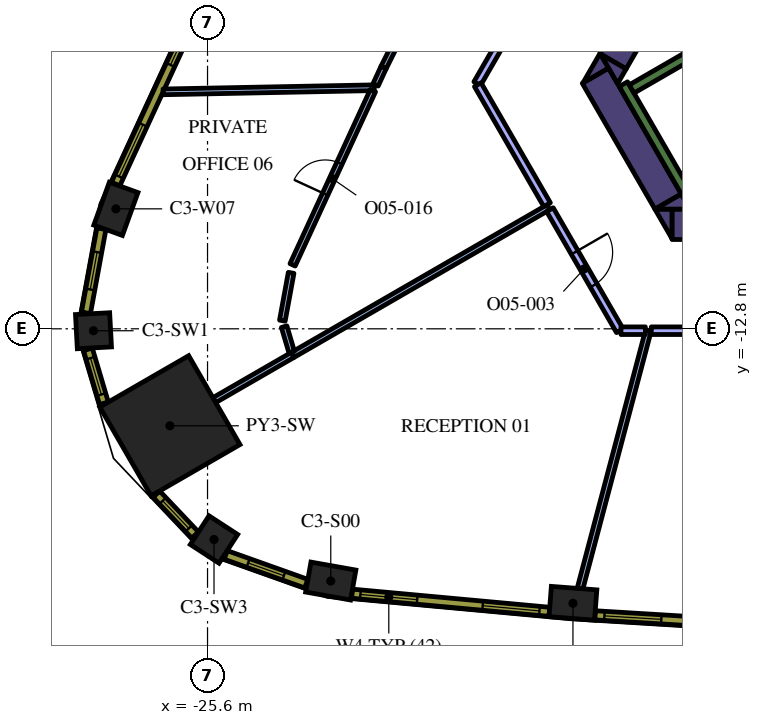
"""IFC4 building model, lengths in metres.
Left out: names, types, materials, properties, quantities, classifications, styles, units other than length and angle.
Written with IfcOpenShell. Run it as: python <this file> out.ifc"""

import sys

from ifc_helpers import new_model, si_unit, direction, frame, frame_2d, origin, origin_2d, place, context, subcontext, project, spatial, polyline, rectangle, outline, extrude, element, fill, save


model = new_model("IFC4")
c1 = context("Model", 3, precision=1e-05, world=origin(), true_north=direction((0.0, 1.0)))
c2 = subcontext(c1, "Body", "Model", "MODEL_VIEW")
j1 = project(units=[si_unit("LENGTHUNIT", "METRE"), si_unit("PLANEANGLEUNIT", "RADIAN")], contexts=[c1])
p1 = place(None, origin())
s1 = spatial("IfcSite", under=j1, at=p1, CompositionType="ELEMENT")
p2 = place(p1, origin())
s2 = spatial("IfcBuilding", under=s1, at=p2, CompositionType="ELEMENT")
p3 = place(p2, frame((0.0, 0.0, 192.0)))
s3 = spatial("IfcBuildingStorey", under=s2, at=p3, CompositionType="ELEMENT", Elevation=192.0)
p4 = place(p3, frame((-26.591, -15.352, 0.0), z_axis=(0.0, 0.0, 1.0), x_axis=(-0.866025403784, -0.5, 0.0)))
e1 = element("IfcColumn", 1, at=p4, inside=s3, PredefinedType="COLUMN", context=c2, shape_type="SweptSolid", body=[
    extrude(rectangle(XDim=2.7, YDim=2.7, at=origin_2d()), origin(), (0.0, 0.0, 1.0), 4.2),
])
for number, where, z_axis, x_axis in (
    (2, (-22.357, -19.437, 0.0), (0.0, 0.0, 1.0), (0.985, -0.175, 0.0)),
    (3, (-15.985, -20.022, 0.0), (0.0, 0.0, 1.0), (0.997, -0.076, 0.0)),
    (4, (-28.012, -9.644, 0.0), (0.0, 0.0, 1.0), (-0.341, -0.94, 0.0)),
):
    element("IfcColumn", number, at=place(p3, frame(where, z_axis=z_axis, x_axis=x_axis)), inside=s3, PredefinedType="COLUMN", context=c2, shape_type="SweptSolid", body=[
        extrude(rectangle(XDim=1.2, YDim=0.8, at=origin_2d()), origin(), (0.0, 0.0, 1.0), 4.2),
    ])
for number, where, z_axis, x_axis in (
    (5, (-28.601, -12.851, 0.0), (0.0, 0.0, 1.0), (0.053, -0.999, 0.0)),
    (6, (-25.43, -18.344, 0.0), (0.0, 0.0, 1.0), (0.838, -0.546, 0.0)),
):
    element("IfcColumn", number, at=place(p3, frame(where, z_axis=z_axis, x_axis=x_axis)), inside=s3, PredefinedType="COLUMN", context=c2, shape_type="SweptSolid", body=[
        extrude(rectangle(XDim=0.9, YDim=0.9, at=origin_2d()), origin(), (0.0, 0.0, 1.0), 4.2),
    ])
p5 = place(p3, frame((-13.378, -10.05, 0.0), z_axis=(0.0, 0.0, 1.0), x_axis=(1.0, 0.0, 0.0)))
e7 = element("IfcWall", 7, at=p5, inside=s3, PredefinedType="SOLIDWALL", context=c2, shape_type="SweptSolid", body=[
    extrude(rectangle(XDim=22.282, YDim=0.8, at=frame_2d((11.141, 0.0))), origin(), (0.0, 0.0, 1.0), 4.2),
])
p6 = place(p3, origin())
e8 = element("IfcWall", 8, at=p6, inside=s3, PredefinedType="SOLIDWALL", context=c2, shape_type="SweptSolid", body=[
    extrude(outline(polyline([(-13.828, -9.65), (-13.38, -9.65), (-13.38, -10.426), (-13.828, -9.65)])), origin(), (0.0, 0.0, 1.0), 4.2),
])
p7 = place(p3, frame((-15.392, -6.14, 0.0), z_axis=(0.0, 0.0, 1.0), x_axis=(0.499984020225, -0.866034629516, 0.0)))
e9 = element("IfcWall", 9, at=p7, inside=s3, PredefinedType="SOLIDWALL", context=c2, shape_type="SweptSolid", body=[
    extrude(rectangle(XDim=3.824, YDim=0.8, at=frame_2d((1.912, 0.0))), origin(), (0.0, 0.0, 1.0), 4.2),
])
e10 = element("IfcWall", 10, at=p6, inside=s3, PredefinedType="SOLIDWALL", context=c2, shape_type="SweptSolid", body=[
    extrude(outline(polyline([(-15.047, -5.938), (-15.719, -6.326), (-15.271, -5.55), (-15.047, -5.938)])), origin(), (0.0, 0.0, 1.0), 4.2),
])
e11 = element("IfcWall", 11, at=p6, inside=s3, PredefinedType="SOLIDWALL", context=c2, shape_type="SweptSolid", body=[
    extrude(outline(polyline([(-12.904, -9.65), (-13.82, -9.65), (-13.133, -9.253), (-12.904, -9.65)])), origin(), (0.0, 0.0, 1.0), 4.2),
])
p8 = place(p3, frame((-13.518, -3.314, 0.0), z_axis=(0.0, 0.0, 1.0), x_axis=(-0.499969377405, -0.866043083026, 0.0)))
e12 = element("IfcWall", 12, at=p8, inside=s3, PredefinedType="SOLIDWALL", context=c2, shape_type="SweptSolid", body=[
    extrude(rectangle(XDim=2.824, YDim=0.8, at=frame_2d((1.412, 0.0))), origin(), (0.0, 0.0, 1.0), 4.2),
])
e13 = element("IfcWall", 13, at=p6, inside=s3, PredefinedType="SOLIDWALL", context=c2, shape_type="SweptSolid", body=[
    extrude(outline(polyline([(-14.809, -6.35), (-15.257, -5.574), (-14.585, -5.962), (-14.809, -6.35)])), origin(), (0.0, 0.0, 1.0), 4.2),
])
p9 = place(p3, frame((-12.84, -9.511, 0.0), z_axis=(0.0, 0.0, 1.0), x_axis=(-0.499997733992, 0.866026712061, 0.0)))
e14 = element("IfcWall", 14, at=p9, inside=s3, PredefinedType="SOLIDWALL", context=c2, shape_type="SweptSolid", body=[
    extrude(rectangle(XDim=3.634, YDim=0.25, at=frame_2d((1.817, 0.0))), origin(), (0.0, 0.0, 1.0), 4.2),
])
p10 = place(p3, frame((-14.44, -6.49, 0.0), z_axis=(0.0, 0.0, 1.0), x_axis=(0.866022966069, 0.500004222222, 0.0)))
e15 = element("IfcWall", 15, at=p10, inside=s3, PredefinedType="SOLIDWALL", context=c2, shape_type="SweptSolid", body=[
    extrude(rectangle(XDim=6.8, YDim=0.25, at=frame_2d((3.4, 0.0))), origin(), (0.0, 0.0, 1.0), 4.2),
])
p11 = place(p3, frame((-15.798, -19.635, 0.0), z_axis=(0.0, 0.0, 1.0), x_axis=(0.255926020624, 0.966696370102, 0.0)))
e16 = element("IfcWall", 16, at=p11, inside=s3, PredefinedType="PARTITIONING", context=c2, shape_type="SweptSolid", body=[
    extrude(rectangle(XDim=7.019, YDim=0.15, at=frame_2d((3.51, 0.0))), origin(), (0.0, 0.0, 1.0), 3.1),
])
p12 = place(p3, frame((-13.924, -12.85, 0.0), z_axis=(0.0, 0.0, 1.0), x_axis=(1.0, 0.0, 0.0)))
e17 = element("IfcWall", 17, at=p12, inside=s3, PredefinedType="PARTITIONING", context=c2, shape_type="SweptSolid", body=[
    extrude(rectangle(XDim=7.894, YDim=0.2, at=frame_2d((3.947, 0.0))), origin(), (0.0, 0.0, 1.0), 3.1),
])
p13 = place(p3, frame((-25.421, -14.677, 0.0), z_axis=(0.0, 0.0, 1.0), x_axis=(0.866013104554, 0.500021302286, 0.0)))
e18 = element("IfcWall", 18, at=p13, inside=s3, PredefinedType="PARTITIONING", context=c2, shape_type="SweptSolid", body=[
    extrude(rectangle(XDim=2.381, YDim=0.15, at=frame_2d((1.19, 0.0))), origin(), (0.0, 0.0, 1.0), 3.1),
])
p14 = place(p3, frame((-23.366, -13.491, 0.0), z_axis=(0.0, 0.0, 1.0), x_axis=(0.866025704444, 0.499999479242, 0.0)))
e19 = element("IfcWall", 19, at=p14, inside=s3, PredefinedType="PARTITIONING", context=c2, shape_type="SweptSolid", body=[
    extrude(rectangle(XDim=7.781, YDim=0.15, at=frame_2d((3.891, 0.0))), origin(), (0.0, 0.0, 1.0), 3.1),
])
p15 = place(p3, frame((-16.59, -9.665, 0.0), z_axis=(0.0, 0.0, 1.0), x_axis=(0.499994443168, -0.866028611999, 0.0)))
e20 = element("IfcWall", 20, at=p15, inside=s3, PredefinedType="PARTITIONING", context=c2, shape_type="SweptSolid", body=[
    extrude(rectangle(XDim=3.678, YDim=0.2, at=frame_2d((1.839, 0.0))), origin(), (0.0, 0.0, 1.0), 3.1),
])
p16 = place(p15, frame((1.3, 0.0, 0.0)))
e21 = element("IfcOpeningElement", 21, at=p16, cuts=e20, PredefinedType="OPENING", context=c2, shape_type="SweptSolid", body=[
    extrude(rectangle(XDim=1.0, YDim=2.1, at=frame_2d((0.5, 1.05))), frame((0.0, 0.11, 0.0), z_axis=(0.0, -1.0, 0.0), x_axis=(1.0, 0.0, 0.0)), (0.0, 0.0, 1.0), 0.22),
])
p17 = place(p3, frame((-14.721, -12.85, 0.0), z_axis=(0.0, 0.0, 1.0), x_axis=(1.0, 0.0, 0.0)))
e22 = element("IfcWall", 22, at=p17, inside=s3, PredefinedType="PARTITIONING", context=c2, shape_type="SweptSolid", body=[
    extrude(rectangle(XDim=0.643, YDim=0.2, at=frame_2d((0.321, 0.0))), origin(), (0.0, 0.0, 1.0), 3.1),
])
p18 = place(p3, frame((-21.213, -6.457, 0.0), z_axis=(0.0, 0.0, 1.0), x_axis=(-0.9998097249, -0.019506767933, 0.0)))
e23 = element("IfcWall", 23, at=p18, inside=s3, PredefinedType="PARTITIONING", context=c2, shape_type="SweptSolid", body=[
    extrude(rectangle(XDim=5.557, YDim=0.15, at=frame_2d((2.778, 0.0))), origin(), (0.0, 0.0, 1.0), 3.1),
])
p19 = place(p3, frame((-20.968, -5.925, 0.0), z_axis=(0.0, 0.0, 1.0), x_axis=(0.446258864447, 0.894903919928, 0.0)))
e24 = element("IfcWall", 24, at=p19, inside=s3, PredefinedType="PARTITIONING", context=c2, shape_type="SweptSolid", body=[
    extrude(rectangle(XDim=5.934, YDim=0.15, at=frame_2d((2.967, 0.0))), origin(), (0.0, 0.0, 1.0), 3.1),
])
p20 = place(p19, frame((2.534, 0.0, 0.0)))
e25 = element("IfcOpeningElement", 25, at=p20, cuts=e24, PredefinedType="OPENING", context=c2, shape_type="SweptSolid", body=[
    extrude(rectangle(XDim=0.9, YDim=2.1, at=frame_2d((0.45, 1.05))), frame((0.0, 0.085, 0.0), z_axis=(0.0, -1.0, 0.0), x_axis=(1.0, 0.0, 0.0)), (0.0, 0.0, 1.0), 0.17),
])
p21 = place(p3, frame((-20.968, -5.925, 0.0), z_axis=(0.0, 0.0, 1.0), x_axis=(-0.418595665074, -0.908172708895, 0.0)))
e26 = element("IfcWall", 26, at=p21, inside=s3, PredefinedType="PARTITIONING", context=c2, shape_type="SweptSolid", body=[
    extrude(rectangle(XDim=0.502, YDim=0.15, at=frame_2d((0.251, 0.0))), origin(), (0.0, 0.0, 1.0), 3.1),
])
p22 = place(p3, frame((-23.362, -11.117, 0.0), z_axis=(0.0, 0.0, 1.0), x_axis=(0.418726921953, 0.908112198372, 0.0)))
e27 = element("IfcWall", 27, at=p22, inside=s3, PredefinedType="PARTITIONING", context=c2, shape_type="SweptSolid", body=[
    extrude(rectangle(XDim=5.048, YDim=0.15, at=frame_2d((2.524, 0.0))), origin(), (0.0, 0.0, 1.0), 3.1),
])
p23 = place(p22, frame((2.048, 0.0, 0.0)))
e28 = element("IfcOpeningElement", 28, at=p23, cuts=e27, PredefinedType="OPENING", context=c2, shape_type="SweptSolid", body=[
    extrude(rectangle(XDim=0.9, YDim=2.1, at=frame_2d((0.45, 1.05))), frame((0.0, 0.085, 0.0), z_axis=(0.0, -1.0, 0.0), x_axis=(1.0, 0.0, 0.0)), (0.0, 0.0, 1.0), 0.17),
])
p24 = place(p3, frame((-23.4, -11.328, 0.0), z_axis=(0.0, 0.0, 1.0), x_axis=(-0.180632672113, -0.983550627962, 0.0)))
e29 = element("IfcWall", 29, at=p24, inside=s3, PredefinedType="PARTITIONING", context=c2, shape_type="SweptSolid", body=[
    extrude(rectangle(XDim=1.279, YDim=0.15, at=frame_2d((0.639, 0.0))), origin(), (0.0, 0.0, 1.0), 3.1),
])
p25 = place(p3, frame((-23.584, -12.744, 0.0), z_axis=(0.0, 0.0, 1.0), x_axis=(0.284337771978, -0.958724168584, 0.0)))
e30 = element("IfcWall", 30, at=p25, inside=s3, PredefinedType="PARTITIONING", context=c2, shape_type="SweptSolid", body=[
    extrude(rectangle(XDim=0.7, YDim=0.15, at=frame_2d((0.35, 0.0))), origin(), (0.0, 0.0, 1.0), 3.1),
])
p26 = place(p3, frame((-14.143, 1.203, 0.0), z_axis=(0.0, 0.0, 1.0), x_axis=(-0.500010806419, -0.866019164606, 0.0)))
e31 = element("IfcWall", 31, at=p26, inside=s3, PredefinedType="PARTITIONING", context=c2, shape_type="SweptSolid", body=[
    extrude(rectangle(XDim=8.721, YDim=0.2, at=frame_2d((4.361, 0.0))), origin(), (0.0, 0.0, 1.0), 3.1),
])
p27 = place(p3, frame((-18.489, -6.376, 0.0), z_axis=(0.0, 0.0, 1.0), x_axis=(0.499954196102, -0.866051847062, 0.0)))
e32 = element("IfcWall", 32, at=p27, inside=s3, PredefinedType="PARTITIONING", context=c2, shape_type="SweptSolid", body=[
    extrude(rectangle(XDim=3.648, YDim=0.2, at=frame_2d((1.824, 0.0))), origin(), (0.0, 0.0, 1.0), 3.1),
])
p28 = place(p3, frame((-21.797, -19.77, 0.0), z_axis=(0.0, 0.0, 1.0), x_axis=(0.995808712151, -0.091460422067, 0.0)))
e33 = element("IfcWall", 33, at=p28, inside=s3, PredefinedType="SOLIDWALL", context=c2, shape_type="SweptSolid", body=[
    extrude(rectangle(XDim=5.213, YDim=0.24, at=frame_2d((2.606, 0.0))), origin(), (0.0, 0.0, 1.0), 3.9),
])
p29 = place(p28, frame((0.221, 0.0, 0.9)))
e34 = element("IfcOpeningElement", 34, at=p29, cuts=e33, PredefinedType="OPENING", context=c2, shape_type="SweptSolid", body=[
    extrude(rectangle(XDim=1.5, YDim=2.55, at=frame_2d((0.75, 1.275))), frame((0.0, 0.13, 0.0), z_axis=(0.0, -1.0, 0.0), x_axis=(1.0, 0.0, 0.0)), (0.0, 0.0, 1.0), 0.26),
])
p30 = place(p28, frame((3.452, 0.0, 0.9)))
e35 = element("IfcOpeningElement", 35, at=p30, cuts=e33, PredefinedType="OPENING", context=c2, shape_type="SweptSolid", body=[
    extrude(rectangle(XDim=1.5, YDim=2.55, at=frame_2d((0.75, 1.275))), frame((0.0, 0.13, 0.0), z_axis=(0.0, -1.0, 0.0), x_axis=(1.0, 0.0, 0.0)), (0.0, 0.0, 1.0), 0.26),
])
p31 = place(p3, frame((-15.405, -20.338, 0.0), z_axis=(0.0, 0.0, 1.0), x_axis=(0.998135294646, -0.061040425794, 0.0)))
e36 = element("IfcWall", 36, at=p31, inside=s3, PredefinedType="SOLIDWALL", context=c2, shape_type="SweptSolid", body=[
    extrude(rectangle(XDim=5.204, YDim=0.24, at=frame_2d((2.602, 0.0))), origin(), (0.0, 0.0, 1.0), 3.9),
])
p32 = place(p31, frame((0.248, 0.0, 0.9)))
e37 = element("IfcOpeningElement", 37, at=p32, cuts=e36, PredefinedType="OPENING", context=c2, shape_type="SweptSolid", body=[
    extrude(rectangle(XDim=1.5, YDim=2.55, at=frame_2d((0.75, 1.275))), frame((0.0, 0.13, 0.0), z_axis=(0.0, -1.0, 0.0), x_axis=(1.0, 0.0, 0.0)), (0.0, 0.0, 1.0), 0.26),
])
p33 = place(p31, frame((3.455, 0.0, 0.9)))
e38 = element("IfcOpeningElement", 38, at=p33, cuts=e36, PredefinedType="OPENING", context=c2, shape_type="SweptSolid", body=[
    extrude(rectangle(XDim=1.5, YDim=2.55, at=frame_2d((0.75, 1.275))), frame((0.0, 0.13, 0.0), z_axis=(0.0, -1.0, 0.0), x_axis=(1.0, 0.0, 0.0)), (0.0, 0.0, 1.0), 0.26),
])
p34 = place(p3, frame((-25.837, -4.258, 0.0), z_axis=(0.0, 0.0, 1.0), x_axis=(-0.418722559465, -0.908114209885, 0.0)))
e39 = element("IfcWall", 39, at=p34, inside=s3, PredefinedType="SOLIDWALL", context=c2, shape_type="SweptSolid", body=[
    extrude(rectangle(XDim=5.213, YDim=0.24, at=frame_2d((2.606, 0.0))), origin(), (0.0, 0.0, 1.0), 3.9),
])
p35 = place(p34, frame((0.261, 0.0, 0.9)))
e40 = element("IfcOpeningElement", 40, at=p35, cuts=e39, PredefinedType="OPENING", context=c2, shape_type="SweptSolid", body=[
    extrude(rectangle(XDim=1.5, YDim=2.55, at=frame_2d((0.75, 1.275))), frame((0.0, 0.13, 0.0), z_axis=(0.0, -1.0, 0.0), x_axis=(1.0, 0.0, 0.0)), (0.0, 0.0, 1.0), 0.26),
])
p36 = place(p34, frame((3.492, 0.0, 0.9)))
e41 = element("IfcOpeningElement", 41, at=p36, cuts=e39, PredefinedType="OPENING", context=c2, shape_type="SweptSolid", body=[
    extrude(rectangle(XDim=1.5, YDim=2.55, at=frame_2d((0.75, 1.275))), frame((0.0, 0.13, 0.0), z_axis=(0.0, -1.0, 0.0), x_axis=(1.0, 0.0, 0.0)), (0.0, 0.0, 1.0), 0.26),
])
p37 = place(p3, frame((-28.393, -10.167, 0.0), z_axis=(0.0, 0.0, 1.0), x_axis=(-0.180737189259, -0.983531427265, 0.0)))
e42 = element("IfcWall", 42, at=p37, inside=s3, PredefinedType="SOLIDWALL", context=c2, shape_type="SweptSolid", body=[
    extrude(rectangle(XDim=2.25, YDim=0.24, at=frame_2d((1.125, 0.0))), origin(), (0.0, 0.0, 1.0), 3.9),
])
p38 = place(p37, frame((0.625, 0.0, 0.9)))
e43 = element("IfcOpeningElement", 43, at=p38, cuts=e42, PredefinedType="OPENING", context=c2, shape_type="SweptSolid", body=[
    extrude(rectangle(XDim=1.0, YDim=2.55, at=frame_2d((0.5, 1.275))), frame((0.0, 0.13, 0.0), z_axis=(0.0, -1.0, 0.0), x_axis=(1.0, 0.0, 0.0)), (0.0, 0.0, 1.0), 0.26),
])
p39 = place(p3, frame((-28.748, -13.34, 0.0), z_axis=(0.0, 0.0, 1.0), x_axis=(0.284413721403, -0.958701640281, 0.0)))
e44 = element("IfcWall", 44, at=p39, inside=s3, PredefinedType="SOLIDWALL", context=c2, shape_type="SweptSolid", body=[
    extrude(rectangle(XDim=1.482, YDim=0.24, at=frame_2d((0.741, 0.0))), origin(), (0.0, 0.0, 1.0), 3.9),
])
p40 = place(p39, frame((0.241, 0.0, 0.9)))
e45 = element("IfcOpeningElement", 45, at=p40, cuts=e44, PredefinedType="OPENING", context=c2, shape_type="SweptSolid", body=[
    extrude(rectangle(XDim=1.0, YDim=2.55, at=frame_2d((0.5, 1.275))), frame((0.0, 0.13, 0.0), z_axis=(0.0, -1.0, 0.0), x_axis=(1.0, 0.0, 0.0)), (0.0, 0.0, 1.0), 0.26),
])
p41 = place(p3, frame((-26.946, -17.151, 0.0), z_axis=(0.0, 0.0, 1.0), x_axis=(0.687986858937, -0.725723144133, 0.0)))
e46 = element("IfcWall", 46, at=p41, inside=s3, PredefinedType="SOLIDWALL", context=c2, shape_type="SweptSolid", body=[
    extrude(rectangle(XDim=1.481, YDim=0.24, at=frame_2d((0.741, 0.0))), origin(), (0.0, 0.0, 1.0), 3.9),
])
p42 = place(p41, frame((0.241, 0.0, 0.9)))
e47 = element("IfcOpeningElement", 47, at=p42, cuts=e46, PredefinedType="OPENING", context=c2, shape_type="SweptSolid", body=[
    extrude(rectangle(XDim=1.0, YDim=2.55, at=frame_2d((0.5, 1.275))), frame((0.0, 0.13, 0.0), z_axis=(0.0, -1.0, 0.0), x_axis=(1.0, 0.0, 0.0)), (0.0, 0.0, 1.0), 0.26),
])
p43 = place(p3, frame((-25.121, -18.751, 0.0), z_axis=(0.0, 0.0, 1.0), x_axis=(0.942099727267, -0.335332825539, 0.0)))
e48 = element("IfcWall", 48, at=p43, inside=s3, PredefinedType="SOLIDWALL", context=c2, shape_type="SweptSolid", body=[
    extrude(rectangle(XDim=2.25, YDim=0.24, at=frame_2d((1.125, 0.0))), origin(), (0.0, 0.0, 1.0), 3.9),
])
p44 = place(p43, frame((0.625, 0.0, 0.9)))
e49 = element("IfcOpeningElement", 49, at=p44, cuts=e48, PredefinedType="OPENING", context=c2, shape_type="SweptSolid", body=[
    extrude(rectangle(XDim=1.0, YDim=2.55, at=frame_2d((0.5, 1.275))), frame((0.0, 0.13, 0.0), z_axis=(0.0, -1.0, 0.0), x_axis=(1.0, 0.0, 0.0)), (0.0, 0.0, 1.0), 0.26),
])
p45 = place(p16, origin())
e50 = element("IfcDoor", 50, at=p45, inside=s3, OperationType="SINGLE_SWING_LEFT", PredefinedType="DOOR", context=c2, shape_type="SweptSolid", body=[
    extrude(rectangle(XDim=1.0, YDim=2.1, at=frame_2d((0.5, 1.05))), frame((0.0, 0.025, 0.0), z_axis=(0.0, -1.0, 0.0), x_axis=(1.0, 0.0, 0.0)), (0.0, 0.0, 1.0), 0.05),
])
fill(e21, e50)
p46 = place(p23, origin())
e51 = element("IfcDoor", 51, at=p46, inside=s3, OperationType="SINGLE_SWING_LEFT", PredefinedType="DOOR", context=c2, shape_type="SweptSolid", body=[
    extrude(rectangle(XDim=0.9, YDim=2.1, at=frame_2d((0.45, 1.05))), frame((0.0, 0.025, 0.0), z_axis=(0.0, -1.0, 0.0), x_axis=(1.0, 0.0, 0.0)), (0.0, 0.0, 1.0), 0.05),
])
fill(e28, e51)
p47 = place(p29, origin())
e52 = element("IfcWindow", 52, at=p47, inside=s3, PartitioningType="SINGLE_PANEL", PredefinedType="WINDOW", context=c2, shape_type="SweptSolid", body=[
    extrude(rectangle(XDim=1.5, YDim=2.55, at=frame_2d((0.75, 1.275))), frame((0.0, 0.04, 0.0), z_axis=(0.0, -1.0, 0.0), x_axis=(1.0, 0.0, 0.0)), (0.0, 0.0, 1.0), 0.06),
])
fill(e34, e52)
p48 = place(p30, origin())
e53 = element("IfcWindow", 53, at=p48, inside=s3, PartitioningType="SINGLE_PANEL", PredefinedType="WINDOW", context=c2, shape_type="SweptSolid", body=[
    extrude(rectangle(XDim=1.5, YDim=2.55, at=frame_2d((0.75, 1.275))), frame((0.0, 0.04, 0.0), z_axis=(0.0, -1.0, 0.0), x_axis=(1.0, 0.0, 0.0)), (0.0, 0.0, 1.0), 0.06),
])
fill(e35, e53)
p49 = place(p32, origin())
e54 = element("IfcWindow", 54, at=p49, inside=s3, PartitioningType="SINGLE_PANEL", PredefinedType="WINDOW", context=c2, shape_type="SweptSolid", body=[
    extrude(rectangle(XDim=1.5, YDim=2.55, at=frame_2d((0.75, 1.275))), frame((0.0, 0.04, 0.0), z_axis=(0.0, -1.0, 0.0), x_axis=(1.0, 0.0, 0.0)), (0.0, 0.0, 1.0), 0.06),
])
fill(e37, e54)
p50 = place(p35, origin())
e55 = element("IfcWindow", 55, at=p50, inside=s3, PartitioningType="SINGLE_PANEL", PredefinedType="WINDOW", context=c2, shape_type="SweptSolid", body=[
    extrude(rectangle(XDim=1.5, YDim=2.55, at=frame_2d((0.75, 1.275))), frame((0.0, 0.04, 0.0), z_axis=(0.0, -1.0, 0.0), x_axis=(1.0, 0.0, 0.0)), (0.0, 0.0, 1.0), 0.06),
])
fill(e40, e55)
p51 = place(p36, origin())
e56 = element("IfcWindow", 56, at=p51, inside=s3, PartitioningType="SINGLE_PANEL", PredefinedType="WINDOW", context=c2, shape_type="SweptSolid", body=[
    extrude(rectangle(XDim=1.5, YDim=2.55, at=frame_2d((0.75, 1.275))), frame((0.0, 0.04, 0.0), z_axis=(0.0, -1.0, 0.0), x_axis=(1.0, 0.0, 0.0)), (0.0, 0.0, 1.0), 0.06),
])
fill(e41, e56)
p52 = place(p38, origin())
e57 = element("IfcWindow", 57, at=p52, inside=s3, PartitioningType="SINGLE_PANEL", PredefinedType="WINDOW", context=c2, shape_type="SweptSolid", body=[
    extrude(rectangle(XDim=1.0, YDim=2.55, at=frame_2d((0.5, 1.275))), frame((0.0, 0.04, 0.0), z_axis=(0.0, -1.0, 0.0), x_axis=(1.0, 0.0, 0.0)), (0.0, 0.0, 1.0), 0.06),
])
fill(e43, e57)
p53 = place(p40, origin())
e58 = element("IfcWindow", 58, at=p53, inside=s3, PartitioningType="SINGLE_PANEL", PredefinedType="WINDOW", context=c2, shape_type="SweptSolid", body=[
    extrude(rectangle(XDim=1.0, YDim=2.55, at=frame_2d((0.5, 1.275))), frame((0.0, 0.04, 0.0), z_axis=(0.0, -1.0, 0.0), x_axis=(1.0, 0.0, 0.0)), (0.0, 0.0, 1.0), 0.06),
])
fill(e45, e58)
p54 = place(p42, origin())
e59 = element("IfcWindow", 59, at=p54, inside=s3, PartitioningType="SINGLE_PANEL", PredefinedType="WINDOW", context=c2, shape_type="SweptSolid", body=[
    extrude(rectangle(XDim=1.0, YDim=2.55, at=frame_2d((0.5, 1.275))), frame((0.0, 0.04, 0.0), z_axis=(0.0, -1.0, 0.0), x_axis=(1.0, 0.0, 0.0)), (0.0, 0.0, 1.0), 0.06),
])
fill(e47, e59)
p55 = place(p44, origin())
e60 = element("IfcWindow", 60, at=p55, inside=s3, PartitioningType="SINGLE_PANEL", PredefinedType="WINDOW", context=c2, shape_type="SweptSolid", body=[
    extrude(rectangle(XDim=1.0, YDim=2.55, at=frame_2d((0.5, 1.275))), frame((0.0, 0.04, 0.0), z_axis=(0.0, -1.0, 0.0), x_axis=(1.0, 0.0, 0.0)), (0.0, 0.0, 1.0), 0.06),
])
fill(e49, e60)
save(model, sys.argv[1])
